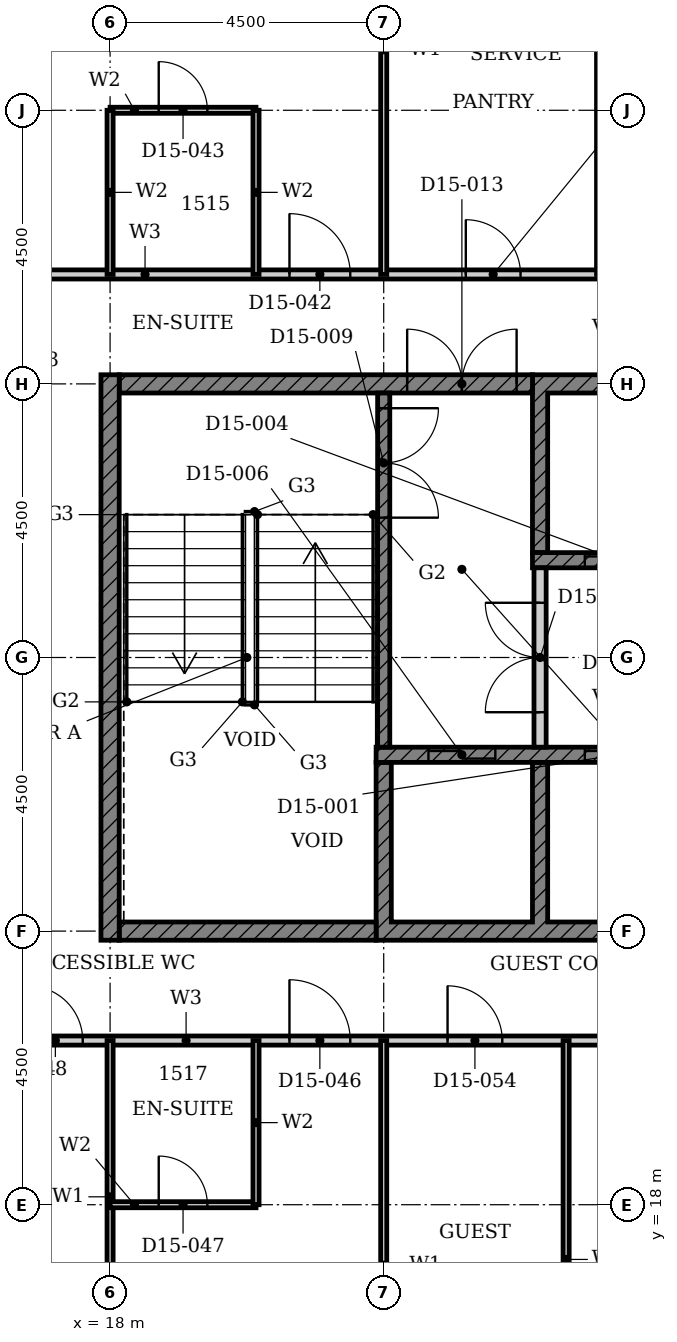
"""IFC4 building model, lengths in metres.
Left out: names, types, materials, properties, quantities, classifications, styles, units other than length and angle.
Written with IfcOpenShell. Run it as: python <this file> out.ifc"""

import sys

from ifc_helpers import new_model, si_unit, direction, frame, frame_2d, origin, place, context, subcontext, project, spatial, polyline, rectangle, outline, extrude, element, fill, save


model = new_model("IFC4")
c1 = context("Model", 3, precision=1e-05, world=origin(), true_north=direction((0.0, 1.0)))
c2 = subcontext(c1, "Body", "Model", "MODEL_VIEW")
j1 = project(units=[si_unit("LENGTHUNIT", "METRE"), si_unit("PLANEANGLEUNIT", "RADIAN")], contexts=[c1])
p1 = place(None, origin())
s1 = spatial("IfcSite", under=j1, at=p1, CompositionType="ELEMENT")
p2 = place(p1, origin())
s2 = spatial("IfcBuilding", under=s1, at=p2, CompositionType="ELEMENT")
p3 = place(p2, frame((0.0, 0.0, 67.2)))
s3 = spatial("IfcBuildingStorey", under=s2, at=p3, CompositionType="ELEMENT", Elevation=67.2)
p4 = place(p3, origin())
e1 = element("IfcWall", 1, at=p4, inside=s3, PredefinedType="SHEAR", context=c2, shape_type="SweptSolid", body=[
    extrude(outline(polyline([(22.375, 22.35), (38.053, 22.35), (38.053, 25.275), (37.803, 25.275), (37.803, 22.65), (35.482, 22.65), (35.482, 25.275), (35.232, 25.275), (35.232, 22.65), (32.911, 22.65), (32.911, 25.275), (32.661, 25.275), (32.661, 22.65), (30.339, 22.65), (30.339, 25.275), (30.089, 25.275), (30.089, 22.65), (27.768, 22.65), (27.768, 25.275), (27.518, 25.275), (27.518, 22.65), (25.197, 22.65), (25.197, 25.275), (24.947, 25.275), (24.947, 22.65), (22.625, 22.65), (22.625, 25.275), (22.375, 25.275), (22.375, 22.35)])), origin(), (0.0, 0.0, 1.0), 3.3),
])
p5 = place(p3, origin())
e2 = element("IfcWall", 2, at=p5, inside=s3, PredefinedType="SHEAR", context=c2, shape_type="SweptSolid", body=[
    extrude(outline(polyline([(24.947, 28.725), (25.197, 28.725), (25.197, 31.35), (27.518, 31.35), (27.518, 28.725), (27.768, 28.725), (27.768, 31.35), (30.089, 31.35), (30.089, 28.725), (30.339, 28.725), (30.339, 31.35), (32.661, 31.35), (32.661, 28.725), (32.911, 28.725), (32.911, 31.35), (35.232, 31.35), (35.232, 28.725), (35.482, 28.725), (35.482, 31.35), (37.803, 31.35), (37.803, 28.725), (38.053, 28.725), (38.053, 31.35), (40.375, 31.35), (40.375, 28.725), (40.625, 28.725), (40.625, 31.65), (24.947, 31.65), (24.947, 28.725)])), origin(), (0.0, 0.0, 1.0), 3.3),
])
p6 = place(p3, frame((18.15, 22.5, 0.0), z_axis=(0.0, 0.0, 1.0), x_axis=(1.0, 0.0, 0.0)))
e3 = element("IfcWall", 3, at=p6, inside=s3, PredefinedType="SHEAR", context=c2, shape_type="SweptSolid", body=[
    extrude(rectangle(XDim=4.225, YDim=0.3, at=frame_2d((2.113, 0.0))), origin(), (0.0, 0.0, 1.0), 3.3),
])
p7 = place(p3, frame((18.15, 31.5, 0.0), z_axis=(0.0, 0.0, 1.0), x_axis=(1.0, 0.0, 0.0)))
e4 = element("IfcWall", 4, at=p7, inside=s3, PredefinedType="SHEAR", context=c2, shape_type="SweptSolid", body=[
    extrude(rectangle(XDim=6.797, YDim=0.3, at=frame_2d((3.398, 0.0))), origin(), (0.0, 0.0, 1.0), 3.3),
])
p8 = place(p7, frame((4.736, 0.0, 0.0)))
e5 = element("IfcOpeningElement", 5, at=p8, cuts=e4, PredefinedType="OPENING", context=c2, shape_type="SweptSolid", body=[
    extrude(rectangle(XDim=1.8, YDim=2.1, at=frame_2d((0.9, 1.05))), frame((0.0, 0.16, 0.0), z_axis=(0.0, -1.0, 0.0), x_axis=(1.0, 0.0, 0.0)), (0.0, 0.0, 1.0), 0.32),
])
p9 = place(p3, frame((18.0, 22.35, 0.0), z_axis=(0.0, 0.0, 1.0), x_axis=(0.0, 1.0, 0.0)))
e6 = element("IfcWall", 6, at=p9, inside=s3, PredefinedType="SHEAR", context=c2, shape_type="SweptSolid", body=[
    extrude(rectangle(XDim=9.3, YDim=0.3, at=frame_2d((4.65, 0.0))), origin(), (0.0, 0.0, 1.0), 3.3),
])
p10 = place(p3, frame((22.375, 25.4, 0.0), z_axis=(0.0, 0.0, 1.0), x_axis=(1.0, 0.0, 0.0)))
e7 = element("IfcWall", 7, at=p10, inside=s3, PredefinedType="SHEAR", context=c2, shape_type="SweptSolid", body=[
    extrude(rectangle(XDim=15.678, YDim=0.25, at=frame_2d((7.839, 0.0))), origin(), (0.0, 0.0, 1.0), 3.3),
])
p11 = place(p10, frame((3.432, 0.0, 0.0)))
e8 = element("IfcOpeningElement", 8, at=p11, cuts=e7, PredefinedType="OPENING", context=c2, shape_type="SweptSolid", body=[
    extrude(rectangle(XDim=1.1, YDim=2.1, at=frame_2d((0.55, 1.05))), frame((0.0, 0.135, 0.0), z_axis=(0.0, -1.0, 0.0), x_axis=(1.0, 0.0, 0.0)), (0.0, 0.0, 1.0), 0.27),
])
p12 = place(p10, frame((11.146, 0.0, 0.0)))
e9 = element("IfcOpeningElement", 9, at=p12, cuts=e7, PredefinedType="OPENING", context=c2, shape_type="SweptSolid", body=[
    extrude(rectangle(XDim=1.1, YDim=2.1, at=frame_2d((0.55, 1.05))), frame((0.0, 0.135, 0.0), z_axis=(0.0, -1.0, 0.0), x_axis=(1.0, 0.0, 0.0)), (0.0, 0.0, 1.0), 0.27),
])
p13 = place(p10, frame((13.718, 0.0, 0.0)))
e10 = element("IfcOpeningElement", 10, at=p13, cuts=e7, PredefinedType="OPENING", context=c2, shape_type="SweptSolid", body=[
    extrude(rectangle(XDim=1.1, YDim=2.1, at=frame_2d((0.55, 1.05))), frame((0.0, 0.135, 0.0), z_axis=(0.0, -1.0, 0.0), x_axis=(1.0, 0.0, 0.0)), (0.0, 0.0, 1.0), 0.27),
])
p14 = place(p10, frame((0.861, 0.0, 0.0)))
e11 = element("IfcOpeningElement", 11, at=p14, cuts=e7, PredefinedType="OPENING", context=c2, shape_type="SweptSolid", body=[
    extrude(rectangle(XDim=1.1, YDim=2.1, at=frame_2d((0.55, 1.05))), frame((0.0, 0.135, 0.0), z_axis=(0.0, -1.0, 0.0), x_axis=(1.0, 0.0, 0.0)), (0.0, 0.0, 1.0), 0.27),
])
p15 = place(p3, frame((24.947, 28.6, 0.0), z_axis=(0.0, 0.0, 1.0), x_axis=(1.0, 0.0, 0.0)))
e12 = element("IfcWall", 12, at=p15, inside=s3, PredefinedType="SHEAR", context=c2, shape_type="SweptSolid", body=[
    extrude(rectangle(XDim=15.678, YDim=0.25, at=frame_2d((7.839, 0.0))), origin(), (0.0, 0.0, 1.0), 3.3),
])
p16 = place(p15, frame((0.861, 0.0, 0.0)))
e13 = element("IfcOpeningElement", 13, at=p16, cuts=e12, PredefinedType="OPENING", context=c2, shape_type="SweptSolid", body=[
    extrude(rectangle(XDim=1.1, YDim=2.1, at=frame_2d((0.55, 1.05))), frame((0.0, 0.135, 0.0), z_axis=(0.0, -1.0, 0.0), x_axis=(1.0, 0.0, 0.0)), (0.0, 0.0, 1.0), 0.27),
])
p17 = place(p15, frame((8.575, 0.0, 0.0)))
e14 = element("IfcOpeningElement", 14, at=p17, cuts=e12, PredefinedType="OPENING", context=c2, shape_type="SweptSolid", body=[
    extrude(rectangle(XDim=1.1, YDim=2.1, at=frame_2d((0.55, 1.05))), frame((0.0, 0.135, 0.0), z_axis=(0.0, -1.0, 0.0), x_axis=(1.0, 0.0, 0.0)), (0.0, 0.0, 1.0), 0.27),
])
p18 = place(p15, frame((13.718, 0.0, 0.0)))
e15 = element("IfcOpeningElement", 15, at=p18, cuts=e12, PredefinedType="OPENING", context=c2, shape_type="SweptSolid", body=[
    extrude(rectangle(XDim=1.1, YDim=2.1, at=frame_2d((0.55, 1.05))), frame((0.0, 0.135, 0.0), z_axis=(0.0, -1.0, 0.0), x_axis=(1.0, 0.0, 0.0)), (0.0, 0.0, 1.0), 0.27),
])
p19 = place(p3, frame((22.5, 31.35, 0.0), z_axis=(0.0, 0.0, 1.0), x_axis=(0.0, -1.0, 0.0)))
e16 = element("IfcWall", 16, at=p19, inside=s3, PredefinedType="SHEAR", context=c2, shape_type="SweptSolid", body=[
    extrude(rectangle(XDim=5.825, YDim=0.2, at=frame_2d((2.913, 0.0))), origin(), (0.0, 0.0, 1.0), 3.3),
])
p20 = place(p19, frame((0.25, 0.0, 0.0)))
e17 = element("IfcOpeningElement", 17, at=p20, cuts=e16, PredefinedType="OPENING", context=c2, shape_type="SweptSolid", body=[
    extrude(rectangle(XDim=1.8, YDim=2.1, at=frame_2d((0.9, 1.05))), frame((0.0, 0.11, 0.0), z_axis=(0.0, -1.0, 0.0), x_axis=(1.0, 0.0, 0.0)), (0.0, 0.0, 1.0), 0.22),
])
p21 = place(p3, frame((25.072, 25.525, 0.0), z_axis=(0.0, 0.0, 1.0), x_axis=(0.0, 1.0, 0.0)))
e18 = element("IfcWall", 18, at=p21, inside=s3, PredefinedType="PARTITIONING", context=c2, shape_type="SweptSolid", body=[
    extrude(rectangle(XDim=2.95, YDim=0.2, at=frame_2d((1.475, 0.0))), origin(), (0.0, 0.0, 1.0), 3.3),
])
p22 = place(p21, frame((0.575, 0.0, 0.0)))
e19 = element("IfcOpeningElement", 19, at=p22, cuts=e18, PredefinedType="OPENING", context=c2, shape_type="SweptSolid", body=[
    extrude(rectangle(XDim=1.8, YDim=2.1, at=frame_2d((0.9, 1.05))), frame((0.0, 0.11, 0.0), z_axis=(0.0, -1.0, 0.0), x_axis=(1.0, 0.0, 0.0)), (0.0, 0.0, 1.0), 0.22),
])
p23 = place(p3, frame((16.2, 20.7, 0.0), z_axis=(0.0, 0.0, 1.0), x_axis=(1.0, 0.0, 0.0)))
e20 = element("IfcWall", 20, at=p23, inside=s3, PredefinedType="PARTITIONING", context=c2, shape_type="SweptSolid", body=[
    extrude(rectangle(XDim=13.5, YDim=0.15, at=frame_2d((6.75, 0.0))), origin(), (0.0, 0.0, 1.0), 3.3),
])
p24 = place(p23, frame((4.75, 0.0, 0.0)))
e21 = element("IfcOpeningElement", 21, at=p24, cuts=e20, PredefinedType="OPENING", context=c2, shape_type="SweptSolid", body=[
    extrude(rectangle(XDim=1.0, YDim=2.1, at=frame_2d((0.5, 1.05))), frame((0.0, 0.085, 0.0), z_axis=(0.0, -1.0, 0.0), x_axis=(1.0, 0.0, 0.0)), (0.0, 0.0, 1.0), 0.17),
])
p25 = place(p23, frame((0.45, 0.0, 0.0)))
e22 = element("IfcOpeningElement", 22, at=p25, cuts=e20, PredefinedType="OPENING", context=c2, shape_type="SweptSolid", body=[
    extrude(rectangle(XDim=0.9, YDim=2.1, at=frame_2d((0.45, 1.05))), frame((0.0, 0.085, 0.0), z_axis=(0.0, -1.0, 0.0), x_axis=(1.0, 0.0, 0.0)), (0.0, 0.0, 1.0), 0.17),
])
p26 = place(p23, frame((7.35, 0.0, 0.0)))
e23 = element("IfcOpeningElement", 23, at=p26, cuts=e20, PredefinedType="OPENING", context=c2, shape_type="SweptSolid", body=[
    extrude(rectangle(XDim=0.9, YDim=2.1, at=frame_2d((0.45, 1.05))), frame((0.0, 0.085, 0.0), z_axis=(0.0, -1.0, 0.0), x_axis=(1.0, 0.0, 0.0)), (0.0, 0.0, 1.0), 0.17),
])
p27 = place(p23, frame((10.95, 0.0, 0.0)))
e24 = element("IfcOpeningElement", 24, at=p27, cuts=e20, PredefinedType="OPENING", context=c2, shape_type="SweptSolid", body=[
    extrude(rectangle(XDim=0.9, YDim=2.1, at=frame_2d((0.45, 1.05))), frame((0.0, 0.085, 0.0), z_axis=(0.0, -1.0, 0.0), x_axis=(1.0, 0.0, 0.0)), (0.0, 0.0, 1.0), 0.17),
])
p28 = place(p3, frame((16.2, 33.3, 0.0), z_axis=(0.0, 0.0, 1.0), x_axis=(1.0, 0.0, 0.0)))
e25 = element("IfcWall", 25, at=p28, inside=s3, PredefinedType="PARTITIONING", context=c2, shape_type="SweptSolid", body=[
    extrude(rectangle(XDim=9.9, YDim=0.15, at=frame_2d((4.95, 0.0))), origin(), (0.0, 0.0, 1.0), 3.3),
])
p29 = place(p28, frame((4.75, 0.0, 0.0)))
e26 = element("IfcOpeningElement", 26, at=p29, cuts=e25, PredefinedType="OPENING", context=c2, shape_type="SweptSolid", body=[
    extrude(rectangle(XDim=1.0, YDim=2.1, at=frame_2d((0.5, 1.05))), frame((0.0, 0.085, 0.0), z_axis=(0.0, -1.0, 0.0), x_axis=(1.0, 0.0, 0.0)), (0.0, 0.0, 1.0), 0.17),
])
p30 = place(p28, frame((7.65, 0.0, 0.0)))
e27 = element("IfcOpeningElement", 27, at=p30, cuts=e25, PredefinedType="OPENING", context=c2, shape_type="SweptSolid", body=[
    extrude(rectangle(XDim=0.9, YDim=2.1, at=frame_2d((0.45, 1.05))), frame((0.0, 0.085, 0.0), z_axis=(0.0, -1.0, 0.0), x_axis=(1.0, 0.0, 0.0)), (0.0, 0.0, 1.0), 0.17),
])
p31 = place(p3, frame((18.0, 15.56, 0.0), z_axis=(0.0, 0.0, 1.0), x_axis=(0.0, 1.0, 0.0)))
e28 = element("IfcWall", 28, at=p31, inside=s3, PredefinedType="PARTITIONING", context=c2, shape_type="SweptSolid", body=[
    extrude(rectangle(XDim=5.14, YDim=0.1, at=frame_2d((2.57, 0.0))), origin(), (0.0, 0.0, 1.0), 3.3),
])
for number, where, z_axis, x_axis in (
    (29, (22.5, 33.3, 0.0), (0.0, 0.0, 1.0), (0.0, 1.0, 0.0)),
    (30, (22.5, 13.31, 0.0), (0.0, 0.0, 1.0), (0.0, 1.0, 0.0)),
):
    element("IfcWall", number, at=place(p3, frame(where, z_axis=z_axis, x_axis=x_axis)), inside=s3, PredefinedType="PARTITIONING", context=c2, shape_type="SweptSolid", body=[
        extrude(rectangle(XDim=7.39, YDim=0.1, at=frame_2d((3.695, 0.0))), origin(), (0.0, 0.0, 1.0), 3.3),
    ])
p32 = place(p3, frame((25.5, 13.5, 0.0), z_axis=(0.0, 0.0, 1.0), x_axis=(0.0, 1.0, 0.0)))
e31 = element("IfcWall", 31, at=p32, inside=s3, PredefinedType="PARTITIONING", context=c2, shape_type="SweptSolid", body=[
    extrude(rectangle(XDim=7.2, YDim=0.1, at=frame_2d((3.6, 0.0))), origin(), (0.0, 0.0, 1.0), 3.3),
])
p33 = place(p3, frame((18.0, 18.0, 0.0), z_axis=(0.0, 0.0, 1.0), x_axis=(1.0, 0.0, 0.0)))
e32 = element("IfcWall", 32, at=p33, inside=s3, PredefinedType="PARTITIONING", context=c2, shape_type="SweptSolid", body=[
    extrude(rectangle(XDim=2.4, YDim=0.1, at=frame_2d((1.2, 0.0))), origin(), (0.0, 0.0, 1.0), 3.3),
])
p34 = place(p33, frame((0.8, 0.0, 0.0)))
e33 = element("IfcOpeningElement", 33, at=p34, cuts=e32, PredefinedType="OPENING", context=c2, shape_type="SweptSolid", body=[
    extrude(rectangle(XDim=0.8, YDim=2.1, at=frame_2d((0.4, 1.05))), frame((0.0, 0.06, 0.0), z_axis=(0.0, -1.0, 0.0), x_axis=(1.0, 0.0, 0.0)), (0.0, 0.0, 1.0), 0.12),
])
p35 = place(p3, frame((18.0, 36.0, 0.0), z_axis=(0.0, 0.0, 1.0), x_axis=(1.0, 0.0, 0.0)))
e34 = element("IfcWall", 34, at=p35, inside=s3, PredefinedType="PARTITIONING", context=c2, shape_type="SweptSolid", body=[
    extrude(rectangle(XDim=2.4, YDim=0.1, at=frame_2d((1.2, 0.0))), origin(), (0.0, 0.0, 1.0), 3.3),
])
p36 = place(p35, frame((0.8, 0.0, 0.0)))
e35 = element("IfcOpeningElement", 35, at=p36, cuts=e34, PredefinedType="OPENING", context=c2, shape_type="SweptSolid", body=[
    extrude(rectangle(XDim=0.8, YDim=2.1, at=frame_2d((0.4, 1.05))), frame((0.0, 0.06, 0.0), z_axis=(0.0, -1.0, 0.0), x_axis=(1.0, 0.0, 0.0)), (0.0, 0.0, 1.0), 0.12),
])
for number, where, z_axis, x_axis in (
    (36, (18.0, 33.3, 0.0), (0.0, 0.0, 1.0), (0.0, 1.0, 0.0)),
    (37, (20.4, 33.3, 0.0), (0.0, 0.0, 1.0), (0.0, 1.0, 0.0)),
    (38, (20.4, 18.0, 0.0), (0.0, 0.0, 1.0), (0.0, 1.0, 0.0)),
):
    element("IfcWall", number, at=place(p3, frame(where, z_axis=z_axis, x_axis=x_axis)), inside=s3, PredefinedType="PARTITIONING", context=c2, shape_type="SweptSolid", body=[
        extrude(rectangle(XDim=2.7, YDim=0.1, at=frame_2d((1.35, 0.0))), origin(), (0.0, 0.0, 1.0), 3.3),
    ])
p37 = place(p3, frame((26.1, 33.3, 0.0), z_axis=(0.0, 0.0, 1.0), x_axis=(0.0, 1.0, 0.0)))
e39 = element("IfcWall", 39, at=p37, inside=s3, PredefinedType="PARTITIONING", context=c2, shape_type="SweptSolid", body=[
    extrude(rectangle(XDim=7.2, YDim=0.2, at=frame_2d((3.6, 0.0))), origin(), (0.0, 0.0, 1.0), 3.3),
])
p38 = place(p11, origin())
e40 = element("IfcDoor", 40, at=p38, inside=s3, OperationType="DOUBLE_DOOR_SLIDING", PredefinedType="DOOR", context=c2, shape_type="SweptSolid", body=[
    extrude(rectangle(XDim=1.1, YDim=2.1, at=frame_2d((0.55, 1.05))), frame((0.0, 0.025, 0.0), z_axis=(0.0, -1.0, 0.0), x_axis=(1.0, 0.0, 0.0)), (0.0, 0.0, 1.0), 0.05),
])
fill(e8, e40)
p39 = place(p16, origin())
e41 = element("IfcDoor", 41, at=p39, inside=s3, OperationType="DOUBLE_DOOR_SLIDING", PredefinedType="DOOR", context=c2, shape_type="SweptSolid", body=[
    extrude(rectangle(XDim=1.1, YDim=2.1, at=frame_2d((0.55, 1.05))), frame((0.0, 0.025, 0.0), z_axis=(0.0, -1.0, 0.0), x_axis=(1.0, 0.0, 0.0)), (0.0, 0.0, 1.0), 0.05),
])
fill(e13, e41)
p40 = place(p14, origin())
e42 = element("IfcDoor", 42, at=p40, inside=s3, OperationType="DOUBLE_DOOR_SLIDING", PredefinedType="DOOR", context=c2, shape_type="SweptSolid", body=[
    extrude(rectangle(XDim=1.1, YDim=2.1, at=frame_2d((0.55, 1.05))), frame((0.0, 0.025, 0.0), z_axis=(0.0, -1.0, 0.0), x_axis=(1.0, 0.0, 0.0)), (0.0, 0.0, 1.0), 0.05),
])
fill(e11, e42)
p41 = place(p20, origin())
e43 = element("IfcDoor", 43, at=p41, inside=s3, OperationType="DOUBLE_DOOR_SINGLE_SWING", PredefinedType="DOOR", context=c2, shape_type="SweptSolid", body=[
    extrude(rectangle(XDim=1.8, YDim=2.1, at=frame_2d((0.9, 1.05))), frame((0.0, 0.025, 0.0), z_axis=(0.0, -1.0, 0.0), x_axis=(1.0, 0.0, 0.0)), (0.0, 0.0, 1.0), 0.05),
])
fill(e17, e43)
p42 = place(p22, origin())
e44 = element("IfcDoor", 44, at=p42, inside=s3, OperationType="DOUBLE_DOOR_SINGLE_SWING", PredefinedType="DOOR", context=c2, shape_type="SweptSolid", body=[
    extrude(rectangle(XDim=1.8, YDim=2.1, at=frame_2d((0.9, 1.05))), frame((0.0, 0.025, 0.0), z_axis=(0.0, -1.0, 0.0), x_axis=(1.0, 0.0, 0.0)), (0.0, 0.0, 1.0), 0.05),
])
fill(e19, e44)
p43 = place(p8, origin())
e45 = element("IfcDoor", 45, at=p43, inside=s3, OperationType="DOUBLE_DOOR_SINGLE_SWING", PredefinedType="DOOR", context=c2, shape_type="SweptSolid", body=[
    extrude(rectangle(XDim=1.8, YDim=2.1, at=frame_2d((0.9, 1.05))), frame((0.0, 0.025, 0.0), z_axis=(0.0, -1.0, 0.0), x_axis=(1.0, 0.0, 0.0)), (0.0, 0.0, 1.0), 0.05),
])
fill(e5, e45)
p44 = place(p29, origin())
e46 = element("IfcDoor", 46, at=p44, inside=s3, OperationType="SINGLE_SWING_RIGHT", PredefinedType="DOOR", context=c2, shape_type="SweptSolid", body=[
    extrude(rectangle(XDim=1.0, YDim=2.1, at=frame_2d((0.5, 1.05))), frame((0.0, 0.025, 0.0), z_axis=(0.0, -1.0, 0.0), x_axis=(1.0, 0.0, 0.0)), (0.0, 0.0, 1.0), 0.05),
])
fill(e26, e46)
p45 = place(p36, origin())
e47 = element("IfcDoor", 47, at=p45, inside=s3, OperationType="SINGLE_SWING_LEFT", PredefinedType="DOOR", context=c2, shape_type="SweptSolid", body=[
    extrude(rectangle(XDim=0.8, YDim=2.1, at=frame_2d((0.4, 1.05))), frame((0.0, 0.025, 0.0), z_axis=(0.0, -1.0, 0.0), x_axis=(1.0, 0.0, 0.0)), (0.0, 0.0, 1.0), 0.05),
])
fill(e35, e47)
p46 = place(p24, origin())
e48 = element("IfcDoor", 48, at=p46, inside=s3, OperationType="SINGLE_SWING_RIGHT", PredefinedType="DOOR", context=c2, shape_type="SweptSolid", body=[
    extrude(rectangle(XDim=1.0, YDim=2.1, at=frame_2d((0.5, 1.05))), frame((0.0, 0.025, 0.0), z_axis=(0.0, -1.0, 0.0), x_axis=(1.0, 0.0, 0.0)), (0.0, 0.0, 1.0), 0.05),
])
fill(e21, e48)
p47 = place(p34, origin())
e49 = element("IfcDoor", 49, at=p47, inside=s3, OperationType="SINGLE_SWING_LEFT", PredefinedType="DOOR", context=c2, shape_type="SweptSolid", body=[
    extrude(rectangle(XDim=0.8, YDim=2.1, at=frame_2d((0.4, 1.05))), frame((0.0, 0.025, 0.0), z_axis=(0.0, -1.0, 0.0), x_axis=(1.0, 0.0, 0.0)), (0.0, 0.0, 1.0), 0.05),
])
fill(e33, e49)
p48 = place(p25, origin())
e50 = element("IfcDoor", 50, at=p48, inside=s3, OperationType="SINGLE_SWING_LEFT", PredefinedType="DOOR", context=c2, shape_type="SweptSolid", body=[
    extrude(rectangle(XDim=0.9, YDim=2.1, at=frame_2d((0.45, 1.05))), frame((0.0, 0.025, 0.0), z_axis=(0.0, -1.0, 0.0), x_axis=(1.0, 0.0, 0.0)), (0.0, 0.0, 1.0), 0.05),
])
fill(e22, e50)
p49 = place(p30, origin())
e51 = element("IfcDoor", 51, at=p49, inside=s3, OperationType="SINGLE_SWING_LEFT", PredefinedType="DOOR", context=c2, shape_type="SweptSolid", body=[
    extrude(rectangle(XDim=0.9, YDim=2.1, at=frame_2d((0.45, 1.05))), frame((0.0, 0.025, 0.0), z_axis=(0.0, -1.0, 0.0), x_axis=(1.0, 0.0, 0.0)), (0.0, 0.0, 1.0), 0.05),
])
fill(e27, e51)
p50 = place(p26, origin())
e52 = element("IfcDoor", 52, at=p50, inside=s3, OperationType="SINGLE_SWING_RIGHT", PredefinedType="DOOR", context=c2, shape_type="SweptSolid", body=[
    extrude(rectangle(XDim=0.9, YDim=2.1, at=frame_2d((0.45, 1.05))), frame((0.0, 0.025, 0.0), z_axis=(0.0, -1.0, 0.0), x_axis=(1.0, 0.0, 0.0)), (0.0, 0.0, 1.0), 0.05),
])
fill(e23, e52)
save(model, sys.argv[1])
